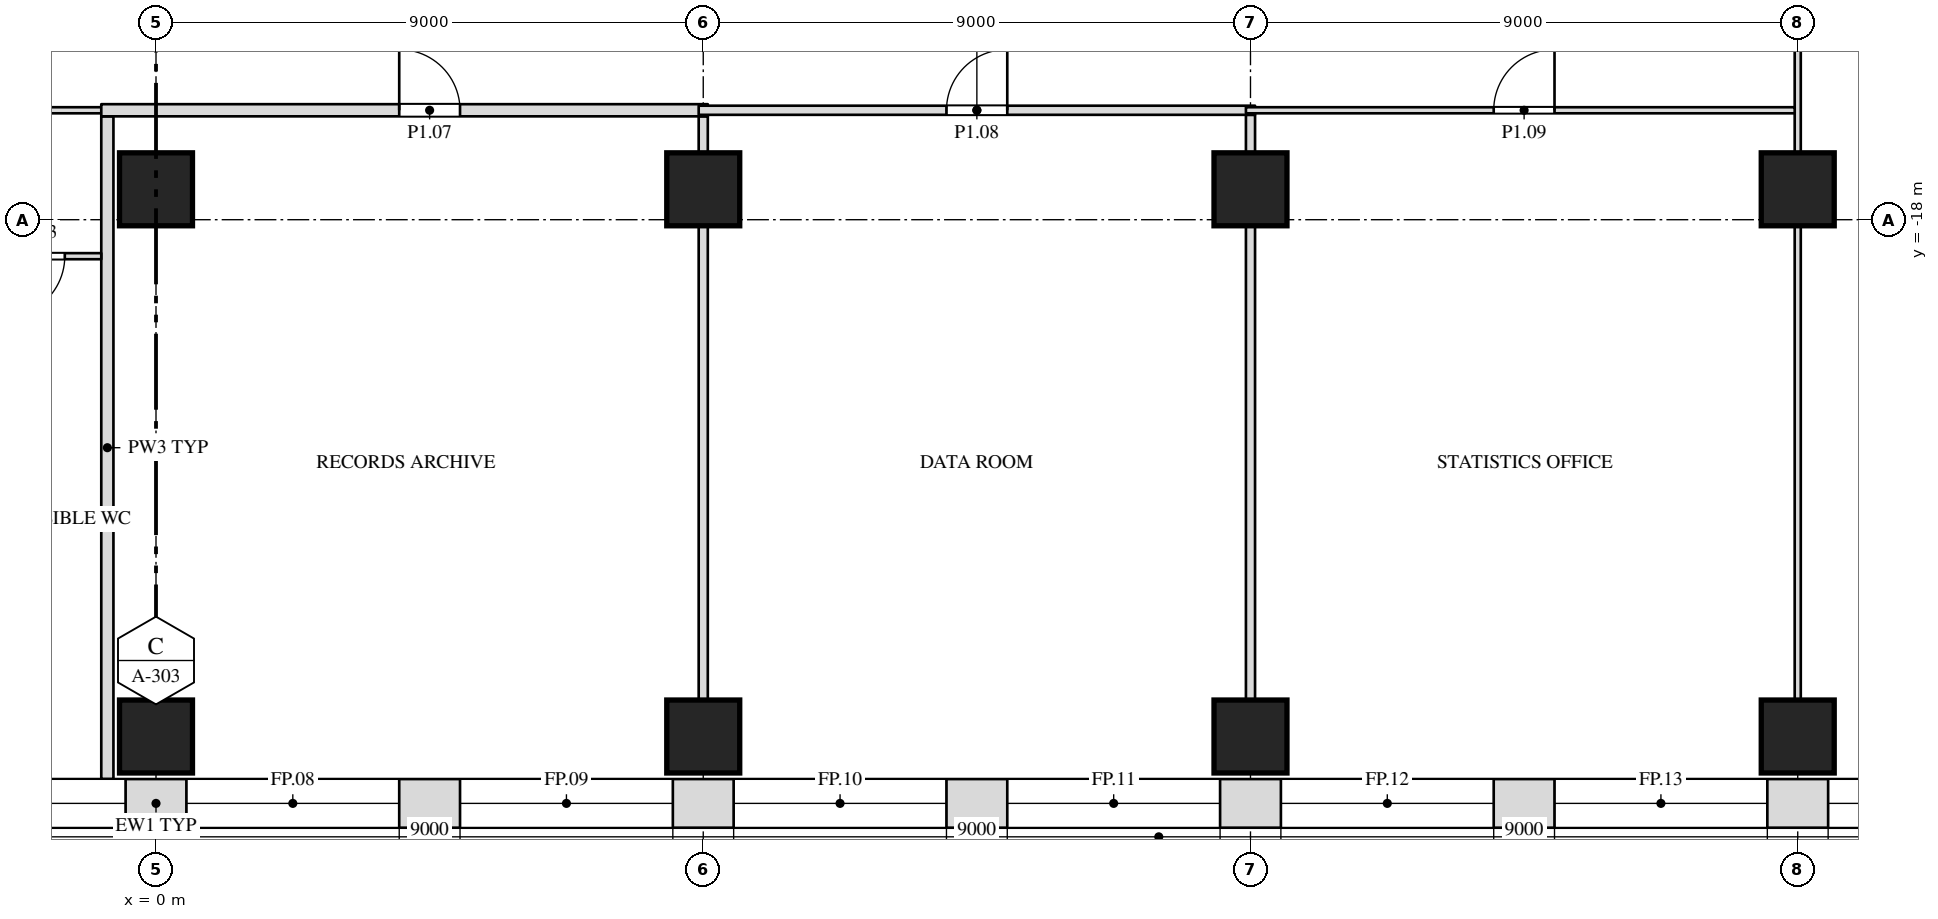
"""IFC4 building model, lengths in metres.
Left out: names, types, materials, properties, quantities, classifications, styles, units other than length and angle.
Written with IfcOpenShell. Run it as: python <this file> out.ifc"""

import sys

from ifc_helpers import new_model, si_unit, direction, frame, frame_2d, origin, origin_2d, place, context, subcontext, project, spatial, rectangle, extrude, element, fill, save


model = new_model("IFC4")
c1 = context("Model", 3, precision=1e-05, world=origin(), true_north=direction((0.0, 1.0)))
c2 = subcontext(c1, "Body", "Model", "MODEL_VIEW")
j1 = project(units=[si_unit("LENGTHUNIT", "METRE"), si_unit("PLANEANGLEUNIT", "RADIAN")], contexts=[c1])
p1 = place(None, origin())
s1 = spatial("IfcSite", under=j1, at=p1, CompositionType="ELEMENT")
p2 = place(p1, origin())
s2 = spatial("IfcBuilding", under=s1, at=p2, CompositionType="ELEMENT")
p3 = place(p2, frame((0.0, 0.0, 9.0)))
s3 = spatial("IfcBuildingStorey", under=s2, at=p3, CompositionType="ELEMENT", Elevation=9.0)
for number, where, z_axis, x_axis in (
    (1, (0.0, -26.5, 0.0), (0.0, 0.0, 1.0), (1.0, 0.0, 0.0)),
    (2, (9.0, -26.5, 0.0), (0.0, 0.0, 1.0), (1.0, 0.0, 0.0)),
    (3, (18.0, -26.5, 0.0), (0.0, 0.0, 1.0), (1.0, 0.0, 0.0)),
    (4, (27.0, -26.5, 0.0), (0.0, 0.0, 1.0), (1.0, 0.0, 0.0)),
    (5, (0.0, -17.5, 0.0), (0.0, 0.0, 1.0), (1.0, 0.0, 0.0)),
    (6, (9.0, -17.5, 0.0), (0.0, 0.0, 1.0), (1.0, 0.0, 0.0)),
    (7, (18.0, -17.5, 0.0), (0.0, 0.0, 1.0), (1.0, 0.0, 0.0)),
    (8, (27.0, -17.5, 0.0), (0.0, 0.0, 1.0), (1.0, 0.0, 0.0)),
):
    element("IfcColumn", number, at=place(p3, frame(where, z_axis=z_axis, x_axis=x_axis)), inside=s3, PredefinedType="COLUMN", context=c2, shape_type="SweptSolid", body=[
        extrude(rectangle(XDim=1.2, YDim=1.2, at=origin_2d()), origin(), (0.0, 0.0, 1.0), 6.0),
    ])
p4 = place(p3, frame((-0.8, -27.2, 0.0), z_axis=(0.0, 0.0, 1.0), x_axis=(0.0, 1.0, 0.0)))
e9 = element("IfcWall", 9, at=p4, inside=s3, PredefinedType="PARTITIONING", context=c2, shape_type="SweptSolid", body=[
    extrude(rectangle(XDim=10.9, YDim=0.2, at=frame_2d((5.45, 0.0))), origin(), (0.0, 0.0, 1.0), 5.7),
])
p5 = place(p3, frame((9.0, -25.9, 0.0), z_axis=(0.0, 0.0, 1.0), x_axis=(0.0, 1.0, 0.0)))
e10 = element("IfcWall", 10, at=p5, inside=s3, PredefinedType="PARTITIONING", context=c2, shape_type="SweptSolid", body=[
    extrude(rectangle(XDim=7.8, YDim=0.15, at=frame_2d((3.9, 0.0))), origin(), (0.0, 0.0, 1.0), 5.088),
])
p6 = place(p3, frame((9.0, -16.9, 0.0), z_axis=(0.0, 0.0, 1.0), x_axis=(0.0, 1.0, 0.0)))
e11 = element("IfcWall", 11, at=p6, inside=s3, PredefinedType="PARTITIONING", context=c2, shape_type="SweptSolid", body=[
    extrude(rectangle(XDim=0.6, YDim=0.15, at=frame_2d((0.3, 0.0))), origin(), (0.0, 0.0, 1.0), 5.7),
])
p7 = place(p3, frame((18.0, -25.9, 0.0), z_axis=(0.0, 0.0, 1.0), x_axis=(0.0, 1.0, 0.0)))
e12 = element("IfcWall", 12, at=p7, inside=s3, PredefinedType="PARTITIONING", context=c2, shape_type="SweptSolid", body=[
    extrude(rectangle(XDim=7.8, YDim=0.15, at=frame_2d((3.9, 0.0))), origin(), (0.0, 0.0, 1.0), 5.088),
])
p8 = place(p3, frame((18.0, -16.9, 0.0), z_axis=(0.0, 0.0, 1.0), x_axis=(0.0, 1.0, 0.0)))
e13 = element("IfcWall", 13, at=p8, inside=s3, PredefinedType="PARTITIONING", context=c2, shape_type="SweptSolid", body=[
    extrude(rectangle(XDim=0.625, YDim=0.15, at=frame_2d((0.312, 0.0))), origin(), (0.0, 0.0, 1.0), 5.7),
])
p9 = place(p3, frame((27.0, -25.9, 0.0), z_axis=(0.0, 0.0, 1.0), x_axis=(0.0, 1.0, 0.0)))
e14 = element("IfcWall", 14, at=p9, inside=s3, PredefinedType="PARTITIONING", context=c2, shape_type="SweptSolid", body=[
    extrude(rectangle(XDim=7.8, YDim=0.1, at=frame_2d((3.9, 0.0))), origin(), (0.0, 0.0, 1.0), 5.088),
])
p10 = place(p3, frame((27.0, -16.9, 0.0), z_axis=(0.0, 0.0, 1.0), x_axis=(0.0, 1.0, 0.0)))
e15 = element("IfcWall", 15, at=p10, inside=s3, PredefinedType="PARTITIONING", context=c2, shape_type="SweptSolid", body=[
    extrude(rectangle(XDim=2.85, YDim=0.1, at=frame_2d((1.425, 0.0))), origin(), (0.0, 0.0, 1.0), 5.088),
])
p11 = place(p3, frame((-8.15, -18.6, 0.0), z_axis=(0.0, 0.0, 1.0), x_axis=(1.0, 0.0, 0.0)))
e16 = element("IfcWall", 16, at=p11, inside=s3, PredefinedType="PARTITIONING", context=c2, shape_type="SweptSolid", body=[
    extrude(rectangle(XDim=7.25, YDim=0.1, at=frame_2d((3.625, 0.0))), origin(), (0.0, 0.0, 1.0), 5.7),
])
p12 = place(p11, frame((0.7, 0.0, 0.0)))
e17 = element("IfcOpeningElement", 17, at=p12, cuts=e16, PredefinedType="OPENING", context=c2, shape_type="SweptSolid", body=[
    extrude(rectangle(XDim=1.0, YDim=2.1, at=frame_2d((0.5, 1.05))), frame((0.0, 0.062, 0.0), z_axis=(0.0, -1.0, 0.0), x_axis=(1.0, 0.0, 0.0)), (0.0, 0.0, 1.0), 0.124),
])
p13 = place(p11, frame((3.2, 0.0, 0.0)))
e18 = element("IfcOpeningElement", 18, at=p13, cuts=e16, PredefinedType="OPENING", context=c2, shape_type="SweptSolid", body=[
    extrude(rectangle(XDim=1.0, YDim=2.1, at=frame_2d((0.5, 1.05))), frame((0.0, 0.062, 0.0), z_axis=(0.0, -1.0, 0.0), x_axis=(1.0, 0.0, 0.0)), (0.0, 0.0, 1.0), 0.124),
])
p14 = place(p11, frame((5.65, 0.0, 0.0)))
e19 = element("IfcOpeningElement", 19, at=p14, cuts=e16, PredefinedType="OPENING", context=c2, shape_type="SweptSolid", body=[
    extrude(rectangle(XDim=1.0, YDim=2.1, at=frame_2d((0.5, 1.05))), frame((0.0, 0.062, 0.0), z_axis=(0.0, -1.0, 0.0), x_axis=(1.0, 0.0, 0.0)), (0.0, 0.0, 1.0), 0.124),
])
p15 = place(p3, frame((-26.95, -16.2, 0.0), z_axis=(0.0, 0.0, 1.0), x_axis=(1.0, 0.0, 0.0)))
e20 = element("IfcWall", 20, at=p15, inside=s3, PredefinedType="PARTITIONING", context=c2, shape_type="SweptSolid", body=[
    extrude(rectangle(XDim=26.25, YDim=0.1, at=frame_2d((13.125, 0.0))), origin(), (0.0, 0.0, 1.0), 5.7),
])
p16 = place(p15, frame((3.95, 0.0, 0.0)))
e21 = element("IfcOpeningElement", 21, at=p16, cuts=e20, PredefinedType="OPENING", context=c2, shape_type="SweptSolid", body=[
    extrude(rectangle(XDim=1.0, YDim=2.1, at=frame_2d((0.5, 1.05))), frame((0.0, 0.062, 0.0), z_axis=(0.0, -1.0, 0.0), x_axis=(1.0, 0.0, 0.0)), (0.0, 0.0, 1.0), 0.124),
])
p17 = place(p15, frame((12.95, 0.0, 0.0)))
e22 = element("IfcOpeningElement", 22, at=p17, cuts=e20, PredefinedType="OPENING", context=c2, shape_type="SweptSolid", body=[
    extrude(rectangle(XDim=1.0, YDim=2.1, at=frame_2d((0.5, 1.05))), frame((0.0, 0.062, 0.0), z_axis=(0.0, -1.0, 0.0), x_axis=(1.0, 0.0, 0.0)), (0.0, 0.0, 1.0), 0.124),
])
p18 = place(p15, frame((21.95, 0.0, 0.0)))
e23 = element("IfcOpeningElement", 23, at=p18, cuts=e20, PredefinedType="OPENING", context=c2, shape_type="SweptSolid", body=[
    extrude(rectangle(XDim=1.0, YDim=2.1, at=frame_2d((0.5, 1.05))), frame((0.0, 0.062, 0.0), z_axis=(0.0, -1.0, 0.0), x_axis=(1.0, 0.0, 0.0)), (0.0, 0.0, 1.0), 0.124),
])
p19 = place(p3, frame((-0.9, -16.2, 0.0), z_axis=(0.0, 0.0, 1.0), x_axis=(1.0, 0.0, 0.0)))
e24 = element("IfcWall", 24, at=p19, inside=s3, PredefinedType="PARTITIONING", context=c2, shape_type="SweptSolid", body=[
    extrude(rectangle(XDim=9.975, YDim=0.2, at=frame_2d((4.987, 0.0))), origin(), (0.0, 0.0, 1.0), 5.7),
])
p20 = place(p19, frame((4.9, 0.0, 0.0)))
e25 = element("IfcOpeningElement", 25, at=p20, cuts=e24, PredefinedType="OPENING", context=c2, shape_type="SweptSolid", body=[
    extrude(rectangle(XDim=1.0, YDim=2.1, at=frame_2d((0.5, 1.05))), frame((0.0, 0.112, 0.0), z_axis=(0.0, -1.0, 0.0), x_axis=(1.0, 0.0, 0.0)), (0.0, 0.0, 1.0), 0.224),
])
p21 = place(p3, frame((8.925, -16.2, 0.0), z_axis=(0.0, 0.0, 1.0), x_axis=(1.0, 0.0, 0.0)))
e26 = element("IfcWall", 26, at=p21, inside=s3, PredefinedType="PARTITIONING", context=c2, shape_type="SweptSolid", body=[
    extrude(rectangle(XDim=9.15, YDim=0.15, at=frame_2d((4.575, 0.0))), origin(), (0.0, 0.0, 1.0), 5.7),
])
p22 = place(p21, frame((4.075, 0.0, 0.0)))
e27 = element("IfcOpeningElement", 27, at=p22, cuts=e26, PredefinedType="OPENING", context=c2, shape_type="SweptSolid", body=[
    extrude(rectangle(XDim=1.0, YDim=2.1, at=frame_2d((0.5, 1.05))), frame((0.0, 0.087, 0.0), z_axis=(0.0, -1.0, 0.0), x_axis=(1.0, 0.0, 0.0)), (0.0, 0.0, 1.0), 0.174),
])
p23 = place(p3, frame((17.925, -16.2, 0.0), z_axis=(0.0, 0.0, 1.0), x_axis=(1.0, 0.0, 0.0)))
e28 = element("IfcWall", 28, at=p23, inside=s3, PredefinedType="PARTITIONING", context=c2, shape_type="SweptSolid", body=[
    extrude(rectangle(XDim=9.025, YDim=0.1, at=frame_2d((4.512, 0.0))), origin(), (0.0, 0.0, 1.0), 5.7),
])
p24 = place(p23, frame((4.075, 0.0, 0.0)))
e29 = element("IfcOpeningElement", 29, at=p24, cuts=e28, PredefinedType="OPENING", context=c2, shape_type="SweptSolid", body=[
    extrude(rectangle(XDim=1.0, YDim=2.1, at=frame_2d((0.5, 1.05))), frame((0.0, 0.062, 0.0), z_axis=(0.0, -1.0, 0.0), x_axis=(1.0, 0.0, 0.0)), (0.0, 0.0, 1.0), 0.124),
])
p25 = place(p3, frame((-32.948, -27.6, 0.0), z_axis=(0.0, 0.0, 1.0), x_axis=(1.0, 0.0, 0.0)))
e30 = element("IfcWall", 30, at=p25, inside=s3, PredefinedType="SOLIDWALL", context=c2, shape_type="SweptSolid", body=[
    extrude(rectangle(XDim=65.895, YDim=0.8, at=frame_2d((32.948, 0.0))), origin(), (0.0, 0.0, 1.0), 5.7),
])
p26 = place(p25, frame((1.948, 0.0, 1.0)))
e31 = element("IfcOpeningElement", 31, at=p26, cuts=e30, PredefinedType="OPENING", context=c2, shape_type="SweptSolid", body=[
    extrude(rectangle(XDim=3.5, YDim=4.0, at=frame_2d((1.75, 2.0))), frame((0.0, 0.412, 0.0), z_axis=(0.0, -1.0, 0.0), x_axis=(1.0, 0.0, 0.0)), (0.0, 0.0, 1.0), 0.824),
])
p27 = place(p25, frame((6.448, 0.0, 1.0)))
e32 = element("IfcOpeningElement", 32, at=p27, cuts=e30, PredefinedType="OPENING", context=c2, shape_type="SweptSolid", body=[
    extrude(rectangle(XDim=3.5, YDim=4.0, at=frame_2d((1.75, 2.0))), frame((0.0, 0.412, 0.0), z_axis=(0.0, -1.0, 0.0), x_axis=(1.0, 0.0, 0.0)), (0.0, 0.0, 1.0), 0.824),
])
p28 = place(p25, frame((10.948, 0.0, 1.0)))
e33 = element("IfcOpeningElement", 33, at=p28, cuts=e30, PredefinedType="OPENING", context=c2, shape_type="SweptSolid", body=[
    extrude(rectangle(XDim=3.5, YDim=4.0, at=frame_2d((1.75, 2.0))), frame((0.0, 0.412, 0.0), z_axis=(0.0, -1.0, 0.0), x_axis=(1.0, 0.0, 0.0)), (0.0, 0.0, 1.0), 0.824),
])
p29 = place(p25, frame((15.448, 0.0, 1.0)))
e34 = element("IfcOpeningElement", 34, at=p29, cuts=e30, PredefinedType="OPENING", context=c2, shape_type="SweptSolid", body=[
    extrude(rectangle(XDim=3.5, YDim=4.0, at=frame_2d((1.75, 2.0))), frame((0.0, 0.412, 0.0), z_axis=(0.0, -1.0, 0.0), x_axis=(1.0, 0.0, 0.0)), (0.0, 0.0, 1.0), 0.824),
])
p30 = place(p25, frame((19.948, 0.0, 1.0)))
e35 = element("IfcOpeningElement", 35, at=p30, cuts=e30, PredefinedType="OPENING", context=c2, shape_type="SweptSolid", body=[
    extrude(rectangle(XDim=3.5, YDim=4.0, at=frame_2d((1.75, 2.0))), frame((0.0, 0.412, 0.0), z_axis=(0.0, -1.0, 0.0), x_axis=(1.0, 0.0, 0.0)), (0.0, 0.0, 1.0), 0.824),
])
p31 = place(p25, frame((24.448, 0.0, 1.0)))
e36 = element("IfcOpeningElement", 36, at=p31, cuts=e30, PredefinedType="OPENING", context=c2, shape_type="SweptSolid", body=[
    extrude(rectangle(XDim=3.5, YDim=4.0, at=frame_2d((1.75, 2.0))), frame((0.0, 0.412, 0.0), z_axis=(0.0, -1.0, 0.0), x_axis=(1.0, 0.0, 0.0)), (0.0, 0.0, 1.0), 0.824),
])
p32 = place(p25, frame((28.948, 0.0, 1.0)))
e37 = element("IfcOpeningElement", 37, at=p32, cuts=e30, PredefinedType="OPENING", context=c2, shape_type="SweptSolid", body=[
    extrude(rectangle(XDim=3.5, YDim=4.0, at=frame_2d((1.75, 2.0))), frame((0.0, 0.412, 0.0), z_axis=(0.0, -1.0, 0.0), x_axis=(1.0, 0.0, 0.0)), (0.0, 0.0, 1.0), 0.824),
])
p33 = place(p25, frame((33.448, 0.0, 1.0)))
e38 = element("IfcOpeningElement", 38, at=p33, cuts=e30, PredefinedType="OPENING", context=c2, shape_type="SweptSolid", body=[
    extrude(rectangle(XDim=3.5, YDim=4.0, at=frame_2d((1.75, 2.0))), frame((0.0, 0.412, 0.0), z_axis=(0.0, -1.0, 0.0), x_axis=(1.0, 0.0, 0.0)), (0.0, 0.0, 1.0), 0.824),
])
p34 = place(p25, frame((37.948, 0.0, 1.0)))
e39 = element("IfcOpeningElement", 39, at=p34, cuts=e30, PredefinedType="OPENING", context=c2, shape_type="SweptSolid", body=[
    extrude(rectangle(XDim=3.5, YDim=4.0, at=frame_2d((1.75, 2.0))), frame((0.0, 0.412, 0.0), z_axis=(0.0, -1.0, 0.0), x_axis=(1.0, 0.0, 0.0)), (0.0, 0.0, 1.0), 0.824),
])
p35 = place(p25, frame((42.448, 0.0, 1.0)))
e40 = element("IfcOpeningElement", 40, at=p35, cuts=e30, PredefinedType="OPENING", context=c2, shape_type="SweptSolid", body=[
    extrude(rectangle(XDim=3.5, YDim=4.0, at=frame_2d((1.75, 2.0))), frame((0.0, 0.412, 0.0), z_axis=(0.0, -1.0, 0.0), x_axis=(1.0, 0.0, 0.0)), (0.0, 0.0, 1.0), 0.824),
])
p36 = place(p25, frame((46.948, 0.0, 1.0)))
e41 = element("IfcOpeningElement", 41, at=p36, cuts=e30, PredefinedType="OPENING", context=c2, shape_type="SweptSolid", body=[
    extrude(rectangle(XDim=3.5, YDim=4.0, at=frame_2d((1.75, 2.0))), frame((0.0, 0.412, 0.0), z_axis=(0.0, -1.0, 0.0), x_axis=(1.0, 0.0, 0.0)), (0.0, 0.0, 1.0), 0.824),
])
p37 = place(p25, frame((51.448, 0.0, 1.0)))
e42 = element("IfcOpeningElement", 42, at=p37, cuts=e30, PredefinedType="OPENING", context=c2, shape_type="SweptSolid", body=[
    extrude(rectangle(XDim=3.5, YDim=4.0, at=frame_2d((1.75, 2.0))), frame((0.0, 0.412, 0.0), z_axis=(0.0, -1.0, 0.0), x_axis=(1.0, 0.0, 0.0)), (0.0, 0.0, 1.0), 0.824),
])
p38 = place(p25, frame((55.948, 0.0, 1.0)))
e43 = element("IfcOpeningElement", 43, at=p38, cuts=e30, PredefinedType="OPENING", context=c2, shape_type="SweptSolid", body=[
    extrude(rectangle(XDim=3.5, YDim=4.0, at=frame_2d((1.75, 2.0))), frame((0.0, 0.412, 0.0), z_axis=(0.0, -1.0, 0.0), x_axis=(1.0, 0.0, 0.0)), (0.0, 0.0, 1.0), 0.824),
])
p39 = place(p25, frame((60.448, 0.0, 1.0)))
e44 = element("IfcOpeningElement", 44, at=p39, cuts=e30, PredefinedType="OPENING", context=c2, shape_type="SweptSolid", body=[
    extrude(rectangle(XDim=3.5, YDim=4.0, at=frame_2d((1.75, 2.0))), frame((0.0, 0.412, 0.0), z_axis=(0.0, -1.0, 0.0), x_axis=(1.0, 0.0, 0.0)), (0.0, 0.0, 1.0), 0.824),
])
p40 = place(p14, origin())
e45 = element("IfcDoor", 45, at=p40, inside=s3, OperationType="SINGLE_SWING_RIGHT", PredefinedType="DOOR", context=c2, shape_type="SweptSolid", body=[
    extrude(rectangle(XDim=1.0, YDim=2.1, at=frame_2d((0.5, 1.05))), frame((0.0, 0.025, 0.0), z_axis=(0.0, -1.0, 0.0), x_axis=(1.0, 0.0, 0.0)), (0.0, 0.0, 1.0), 0.05),
])
fill(e19, e45)
p41 = place(p20, origin())
e46 = element("IfcDoor", 46, at=p41, inside=s3, OperationType="SINGLE_SWING_LEFT", PredefinedType="DOOR", context=c2, shape_type="SweptSolid", body=[
    extrude(rectangle(XDim=1.0, YDim=2.1, at=frame_2d((0.5, 1.05))), frame((0.0, 0.025, 0.0), z_axis=(0.0, -1.0, 0.0), x_axis=(1.0, 0.0, 0.0)), (0.0, 0.0, 1.0), 0.05),
])
fill(e25, e46)
p42 = place(p22, origin())
e47 = element("IfcDoor", 47, at=p42, inside=s3, OperationType="SINGLE_SWING_RIGHT", PredefinedType="DOOR", context=c2, shape_type="SweptSolid", body=[
    extrude(rectangle(XDim=1.0, YDim=2.1, at=frame_2d((0.5, 1.05))), frame((0.0, 0.025, 0.0), z_axis=(0.0, -1.0, 0.0), x_axis=(1.0, 0.0, 0.0)), (0.0, 0.0, 1.0), 0.05),
])
fill(e27, e47)
p43 = place(p24, origin())
e48 = element("IfcDoor", 48, at=p43, inside=s3, OperationType="SINGLE_SWING_RIGHT", PredefinedType="DOOR", context=c2, shape_type="SweptSolid", body=[
    extrude(rectangle(XDim=1.0, YDim=2.1, at=frame_2d((0.5, 1.05))), frame((0.0, 0.025, 0.0), z_axis=(0.0, -1.0, 0.0), x_axis=(1.0, 0.0, 0.0)), (0.0, 0.0, 1.0), 0.05),
])
fill(e29, e48)
p44 = place(p32, origin())
e49 = element("IfcWindow", 49, at=p44, inside=s3, PartitioningType="SINGLE_PANEL", PredefinedType="WINDOW", context=c2, shape_type="SweptSolid", body=[
    extrude(rectangle(XDim=3.5, YDim=4.0, at=frame_2d((1.75, 2.0))), frame((0.0, 0.03, 0.0), z_axis=(0.0, -1.0, 0.0), x_axis=(1.0, 0.0, 0.0)), (0.0, 0.0, 1.0), 0.06),
])
fill(e37, e49)
p45 = place(p33, origin())
e50 = element("IfcWindow", 50, at=p45, inside=s3, PartitioningType="SINGLE_PANEL", PredefinedType="WINDOW", context=c2, shape_type="SweptSolid", body=[
    extrude(rectangle(XDim=3.5, YDim=4.0, at=frame_2d((1.75, 2.0))), frame((0.0, 0.03, 0.0), z_axis=(0.0, -1.0, 0.0), x_axis=(1.0, 0.0, 0.0)), (0.0, 0.0, 1.0), 0.06),
])
fill(e38, e50)
p46 = place(p34, origin())
e51 = element("IfcWindow", 51, at=p46, inside=s3, PartitioningType="SINGLE_PANEL", PredefinedType="WINDOW", context=c2, shape_type="SweptSolid", body=[
    extrude(rectangle(XDim=3.5, YDim=4.0, at=frame_2d((1.75, 2.0))), frame((0.0, 0.03, 0.0), z_axis=(0.0, -1.0, 0.0), x_axis=(1.0, 0.0, 0.0)), (0.0, 0.0, 1.0), 0.06),
])
fill(e39, e51)
p47 = place(p35, origin())
e52 = element("IfcWindow", 52, at=p47, inside=s3, PartitioningType="SINGLE_PANEL", PredefinedType="WINDOW", context=c2, shape_type="SweptSolid", body=[
    extrude(rectangle(XDim=3.5, YDim=4.0, at=frame_2d((1.75, 2.0))), frame((0.0, 0.03, 0.0), z_axis=(0.0, -1.0, 0.0), x_axis=(1.0, 0.0, 0.0)), (0.0, 0.0, 1.0), 0.06),
])
fill(e40, e52)
p48 = place(p36, origin())
e53 = element("IfcWindow", 53, at=p48, inside=s3, PartitioningType="SINGLE_PANEL", PredefinedType="WINDOW", context=c2, shape_type="SweptSolid", body=[
    extrude(rectangle(XDim=3.5, YDim=4.0, at=frame_2d((1.75, 2.0))), frame((0.0, 0.03, 0.0), z_axis=(0.0, -1.0, 0.0), x_axis=(1.0, 0.0, 0.0)), (0.0, 0.0, 1.0), 0.06),
])
fill(e41, e53)
p49 = place(p37, origin())
e54 = element("IfcWindow", 54, at=p49, inside=s3, PartitioningType="SINGLE_PANEL", PredefinedType="WINDOW", context=c2, shape_type="SweptSolid", body=[
    extrude(rectangle(XDim=3.5, YDim=4.0, at=frame_2d((1.75, 2.0))), frame((0.0, 0.03, 0.0), z_axis=(0.0, -1.0, 0.0), x_axis=(1.0, 0.0, 0.0)), (0.0, 0.0, 1.0), 0.06),
])
fill(e42, e54)
p50 = place(p38, origin())
e55 = element("IfcWindow", 55, at=p50, inside=s3, PartitioningType="SINGLE_PANEL", PredefinedType="WINDOW", context=c2, shape_type="SweptSolid", body=[
    extrude(rectangle(XDim=3.5, YDim=4.0, at=frame_2d((1.75, 2.0))), frame((0.0, 0.03, 0.0), z_axis=(0.0, -1.0, 0.0), x_axis=(1.0, 0.0, 0.0)), (0.0, 0.0, 1.0), 0.06),
])
fill(e43, e55)
p51 = place(p39, origin())
e56 = element("IfcWindow", 56, at=p51, inside=s3, PartitioningType="SINGLE_PANEL", PredefinedType="WINDOW", context=c2, shape_type="SweptSolid", body=[
    extrude(rectangle(XDim=3.5, YDim=4.0, at=frame_2d((1.75, 2.0))), frame((0.0, 0.03, 0.0), z_axis=(0.0, -1.0, 0.0), x_axis=(1.0, 0.0, 0.0)), (0.0, 0.0, 1.0), 0.06),
])
fill(e44, e56)
save(model, sys.argv[1])
